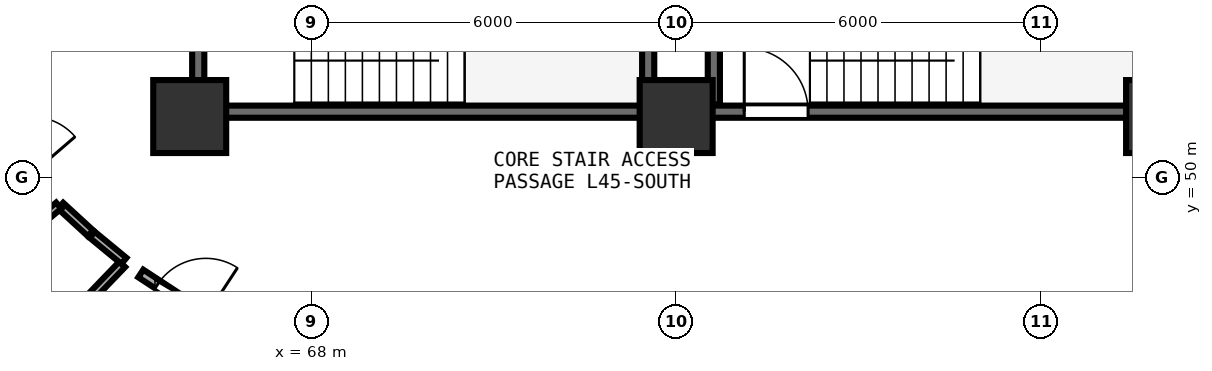
"""IFC4 building model, lengths in metres.
Left out: names, types, materials, properties, quantities, classifications, styles, units other than length and angle.
Written with IfcOpenShell. Run it as: python <this file> out.ifc"""

import sys

from ifc_helpers import new_model, si_unit, direction, frame, frame_2d, origin, origin_2d, place, context, subcontext, project, spatial, rectangle, extrude, element, fill, save


model = new_model("IFC4")
c1 = context("Model", 3, precision=1e-05, world=origin(), true_north=direction((0.0, 1.0)))
c2 = subcontext(c1, "Body", "Model", "MODEL_VIEW")
j1 = project(units=[si_unit("LENGTHUNIT", "METRE"), si_unit("PLANEANGLEUNIT", "RADIAN")], contexts=[c1])
p1 = place(None, origin())
s1 = spatial("IfcSite", under=j1, at=p1, CompositionType="ELEMENT")
p2 = place(p1, origin())
s2 = spatial("IfcBuilding", under=s1, at=p2, CompositionType="ELEMENT")
p3 = place(p2, frame((0.0, 0.0, 176.85)))
s3 = spatial("IfcBuildingStorey", under=s2, at=p3, CompositionType="ELEMENT", Elevation=176.85)
for number, where, z_axis, x_axis in (
    (1, (66.0, 51.0, 0.0), (0.0, 0.0, 1.0), (1.0, 0.0, 0.0)),
    (2, (74.0, 51.0, 0.0), (0.0, 0.0, 1.0), (1.0, 0.0, 0.0)),
    (3, (82.0, 51.0, 0.0), (0.0, 0.0, 1.0), (1.0, 0.0, 0.0)),
):
    element("IfcColumn", number, at=place(p3, frame(where, z_axis=z_axis, x_axis=x_axis)), inside=s3, PredefinedType="PILASTER", context=c2, shape_type="SweptSolid", body=[
        extrude(rectangle(XDim=1.2, YDim=1.2, at=origin_2d()), origin(), (0.0, 0.0, 1.0), 3.75),
    ])
p4 = place(p3, frame((74.0, 51.08, 0.0), z_axis=(0.0, 0.0, 1.0), x_axis=(1.0, 0.0, 0.0)))
e4 = element("IfcWall", 4, at=p4, inside=s3, PredefinedType="SHEAR", context=c2, shape_type="SweptSolid", body=[
    extrude(rectangle(XDim=7.9, YDim=0.2, at=frame_2d((3.95, 0.0))), origin(), (0.0, 0.0, 1.0), 3.49),
])
p5 = place(p4, frame((1.12, 0.0, 0.0)))
e5 = element("IfcOpeningElement", 5, at=p5, cuts=e4, PredefinedType="OPENING", context=c2, shape_type="SweptSolid", body=[
    extrude(rectangle(XDim=1.05, YDim=2.1, at=frame_2d((0.525, 1.05))), frame((0.0, 0.11, 0.0), z_axis=(0.0, -1.0, 0.0), x_axis=(1.0, 0.0, 0.0)), (0.0, 0.0, 1.0), 0.22),
])
p6 = place(p3, frame((74.62, 54.27, 0.0), z_axis=(0.0, 0.0, 1.0), x_axis=(0.0, -1.0, 0.0)))
e6 = element("IfcWall", 6, at=p6, inside=s3, PredefinedType="SHEAR", context=c2, shape_type="SweptSolid", body=[
    extrude(rectangle(XDim=3.07, YDim=0.2, at=frame_2d((1.535, 0.0))), origin(), (0.0, 0.0, 1.0), 3.49),
])
p7 = place(p3, frame((66.26, 51.08, 0.0), z_axis=(0.0, 0.0, 1.0), x_axis=(1.0, 0.0, 0.0)))
e7 = element("IfcWall", 7, at=p7, inside=s3, PredefinedType="SHEAR", context=c2, shape_type="SweptSolid", body=[
    extrude(rectangle(XDim=7.16, YDim=0.2, at=frame_2d((3.58, 0.0))), origin(), (0.0, 0.0, 1.0), 3.49),
])
p8 = place(p3, frame((73.54, 51.2, 0.0), z_axis=(0.0, 0.0, 1.0), x_axis=(0.0, 1.0, 0.0)))
e8 = element("IfcWall", 8, at=p8, inside=s3, PredefinedType="SHEAR", context=c2, shape_type="SweptSolid", body=[
    extrude(rectangle(XDim=3.07, YDim=0.2, at=frame_2d((1.535, 0.0))), origin(), (0.0, 0.0, 1.0), 3.49),
])
p9 = place(p3, frame((66.14, 54.27, 0.0), z_axis=(0.0, 0.0, 1.0), x_axis=(0.0, -1.0, 0.0)))
e9 = element("IfcWall", 9, at=p9, inside=s3, PredefinedType="SHEAR", context=c2, shape_type="SweptSolid", body=[
    extrude(rectangle(XDim=3.07, YDim=0.2, at=frame_2d((1.535, 0.0))), origin(), (0.0, 0.0, 1.0), 3.49),
])
p10 = place(p9, frame((1.01, 0.0, 0.0)))
e10 = element("IfcOpeningElement", 10, at=p10, cuts=e9, PredefinedType="OPENING", context=c2, shape_type="SweptSolid", body=[
    extrude(rectangle(XDim=1.05, YDim=2.1, at=frame_2d((0.525, 1.05))), frame((0.0, 0.11, 0.0), z_axis=(0.0, -1.0, 0.0), x_axis=(1.0, 0.0, 0.0)), (0.0, 0.0, 1.0), 0.22),
])
p11 = place(p3, frame((64.891, 48.571, 0.0), z_axis=(0.0, 0.0, 1.0), x_axis=(-0.69341503006, -0.720538407086, 0.0)))
e11 = element("IfcWall", 11, at=p11, inside=s3, PredefinedType="PLUMBINGWALL", context=c2, shape_type="SweptSolid", body=[
    extrude(rectangle(XDim=3.312, YDim=0.13, at=frame_2d((1.656, 0.0))), origin(), (0.0, 0.0, 1.0), 3.175),
])
p12 = place(p11, frame((1.226, 0.0, 0.0)))
e12 = element("IfcOpeningElement", 12, at=p12, cuts=e11, PredefinedType="OPENING", context=c2, shape_type="SweptSolid", body=[
    extrude(rectangle(XDim=0.86, YDim=2.05, at=frame_2d((0.43, 1.025))), frame((0.0, 0.075, 0.0), z_axis=(0.0, -1.0, 0.0), x_axis=(1.0, 0.0, 0.0)), (0.0, 0.0, 1.0), 0.15),
])
p13 = place(p3, frame((65.195, 48.419, 0.0), z_axis=(0.0, 0.0, 1.0), x_axis=(0.836324272787, -0.548235087118, 0.0)))
e13 = element("IfcWall", 13, at=p13, inside=s3, PredefinedType="PARTITIONING", context=c2, shape_type="SweptSolid", body=[
    extrude(rectangle(XDim=1.608, YDim=0.15, at=frame_2d((0.804, 0.0))), origin(), (0.0, 0.0, 1.0), 2.975),
])
p14 = place(p13, frame((0.329, 0.0, 0.0)))
e14 = element("IfcOpeningElement", 14, at=p14, cuts=e13, PredefinedType="OPENING", context=c2, shape_type="SweptSolid", body=[
    extrude(rectangle(XDim=0.95, YDim=2.08, at=frame_2d((0.475, 1.04))), frame((0.0, 0.085, 0.0), z_axis=(0.0, -1.0, 0.0), x_axis=(1.0, 0.0, 0.0)), (0.0, 0.0, 1.0), 0.17),
])
p15 = place(p3, frame((75.129, 45.623, 0.0), z_axis=(0.0, 0.0, 1.0), x_axis=(0.939734662541, 0.341904612458, 0.0)))
e15 = element("IfcWall", 15, at=p15, inside=s3, PredefinedType="PARTITIONING", context=c2, shape_type="SweptSolid", body=[
    extrude(rectangle(XDim=8.13, YDim=0.1, at=frame_2d((4.065, 0.0))), origin(), (0.0, 0.0, 1.0), 2.975),
])
p16 = place(p3, frame((63.875, 49.534, 0.0), z_axis=(0.0, 0.0, 1.0), x_axis=(0.736047371117, -0.676930031444, 0.0)))
e16 = element("IfcWall", 16, at=p16, inside=s3, PredefinedType="PLUMBINGWALL", context=c2, shape_type="SweptSolid", body=[
    extrude(rectangle(XDim=0.669, YDim=0.13, at=frame_2d((0.334, 0.0))), origin(), (0.0, 0.0, 1.0), 2.975),
])
p17 = place(p3, frame((64.397, 49.055, 0.0), z_axis=(0.0, 0.0, 1.0), x_axis=(0.771595512941, -0.636113483908, 0.0)))
e17 = element("IfcWall", 17, at=p17, inside=s3, PredefinedType="PLUMBINGWALL", context=c2, shape_type="SweptSolid", body=[
    extrude(rectangle(XDim=0.674, YDim=0.13, at=frame_2d((0.337, 0.0))), origin(), (0.0, 0.0, 1.0), 3.48),
])
p18 = place(p3, frame((61.212, 47.334, 0.0), z_axis=(0.0, 0.0, 1.0), x_axis=(0.767100423645, 0.641527037656, 0.0)))
e18 = element("IfcWall", 18, at=p18, inside=s3, PredefinedType="PLUMBINGWALL", context=c2, shape_type="SweptSolid", body=[
    extrude(rectangle(XDim=3.432, YDim=0.13, at=frame_2d((1.716, 0.0))), origin(), (0.0, 0.0, 1.0), 2.975),
])
p19 = place(p5, origin())
e19 = element("IfcDoor", 19, at=p19, inside=s3, OperationType="SINGLE_SWING_LEFT", PredefinedType="DOOR", context=c2, shape_type="SweptSolid", body=[
    extrude(rectangle(XDim=1.05, YDim=2.1, at=frame_2d((0.525, 1.05))), frame((0.0, 0.025, 0.0), z_axis=(0.0, -1.0, 0.0), x_axis=(1.0, 0.0, 0.0)), (0.0, 0.0, 1.0), 0.05),
])
fill(e5, e19)
p20 = place(p14, origin())
e20 = element("IfcDoor", 20, at=p20, inside=s3, OperationType="SINGLE_SWING_RIGHT", PredefinedType="DOOR", context=c2, shape_type="SweptSolid", body=[
    extrude(rectangle(XDim=0.95, YDim=2.08, at=frame_2d((0.475, 1.04))), frame((0.0, 0.025, 0.0), z_axis=(0.0, -1.0, 0.0), x_axis=(1.0, 0.0, 0.0)), (0.0, 0.0, 1.0), 0.05),
])
fill(e14, e20)
save(model, sys.argv[1])
